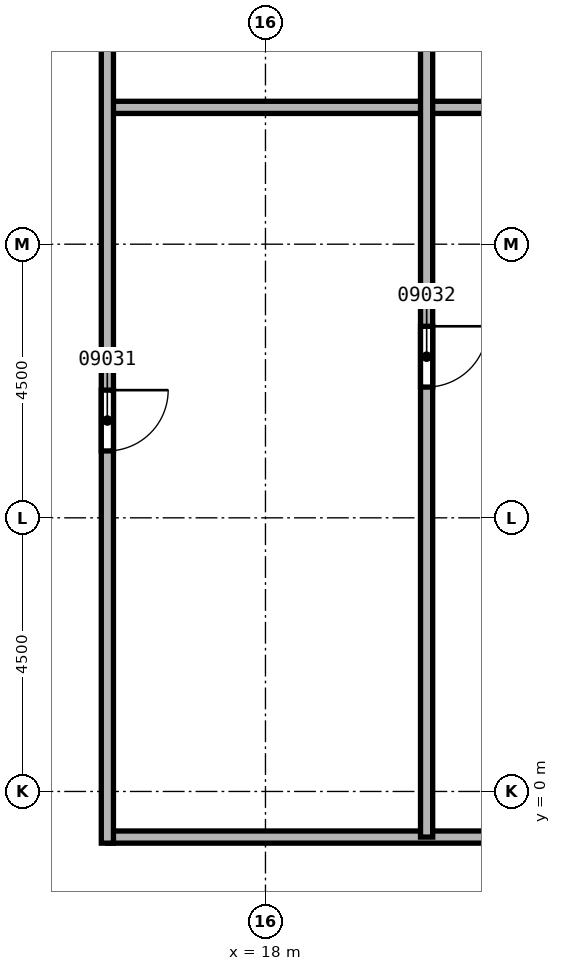
"""IFC4 building model, lengths in metres.
Left out: names, types, materials, properties, quantities, classifications, styles, units other than length and angle.
Written with IfcOpenShell. Run it as: python <this file> out.ifc"""

import sys

from ifc_helpers import new_model, si_unit, direction, frame, frame_2d, origin, place, context, subcontext, project, spatial, rectangle, extrude, element, fill, save


model = new_model("IFC4")
c1 = context("Model", 3, precision=1e-05, world=origin(), true_north=direction((0.0, 1.0)))
c2 = subcontext(c1, "Body", "Model", "MODEL_VIEW")
j1 = project(units=[si_unit("LENGTHUNIT", "METRE"), si_unit("PLANEANGLEUNIT", "RADIAN")], contexts=[c1])
p1 = place(None, origin())
s1 = spatial("IfcSite", under=j1, at=p1, CompositionType="ELEMENT")
p2 = place(p1, origin())
s2 = spatial("IfcBuilding", under=s1, at=p2, CompositionType="ELEMENT")
p3 = place(p2, frame((0.0, 0.0, 162.0)))
s3 = spatial("IfcBuildingStorey", under=s2, at=p3, CompositionType="ELEMENT", Elevation=162.0)
p4 = place(p3, frame((15.4, -0.75, 0.0), z_axis=(0.0, 0.0, 1.0), x_axis=(1.0, 0.0, 0.0)))
e1 = element("IfcWall", 1, at=p4, inside=s3, PredefinedType="PARTITIONING", context=c2, shape_type="SweptSolid", body=[
    extrude(rectangle(XDim=18.45, YDim=0.2, at=frame_2d((9.225, 0.0))), origin(), (0.0, 0.0, 1.0), 3.7),
])
p5 = place(p3, frame((15.4, 11.25, 0.0), z_axis=(0.0, 0.0, 1.0), x_axis=(1.0, 0.0, 0.0)))
e2 = element("IfcWall", 2, at=p5, inside=s3, PredefinedType="PARTITIONING", context=c2, shape_type="SweptSolid", body=[
    extrude(rectangle(XDim=11.7, YDim=0.2, at=frame_2d((5.85, 0.0))), origin(), (0.0, 0.0, 1.0), 3.7),
])
p6 = place(p3, frame((15.4, 23.25, 0.0), z_axis=(0.0, 0.0, 1.0), x_axis=(0.0, -1.0, 0.0)))
e3 = element("IfcWall", 3, at=p6, inside=s3, PredefinedType="PARTITIONING", context=c2, shape_type="SweptSolid", body=[
    extrude(rectangle(XDim=24.1, YDim=0.2, at=frame_2d((12.05, 0.0))), origin(), (0.0, 0.0, 1.0), 3.7),
])
p7 = place(p6, frame((16.65, 0.0, 0.0)))
e4 = element("IfcOpeningElement", 4, at=p7, cuts=e3, PredefinedType="OPENING", context=c2, shape_type="SweptSolid", body=[
    extrude(rectangle(XDim=1.0, YDim=2.1, at=frame_2d((0.5, 1.05))), frame((0.0, 0.1, 0.0), z_axis=(0.0, -1.0, 0.0), x_axis=(1.0, 0.0, 0.0)), (0.0, 0.0, 1.0), 0.2),
])
p8 = place(p6, frame((2.8, 0.0, 0.0)))
e5 = element("IfcOpeningElement", 5, at=p8, cuts=e3, PredefinedType="OPENING", context=c2, shape_type="SweptSolid", body=[
    extrude(rectangle(XDim=1.0, YDim=2.1, at=frame_2d((0.5, 1.05))), frame((0.0, 0.1, 0.0), z_axis=(0.0, -1.0, 0.0), x_axis=(1.0, 0.0, 0.0)), (0.0, 0.0, 1.0), 0.2),
])
p9 = place(p3, frame((20.65, 23.25, 0.0), z_axis=(0.0, 0.0, 1.0), x_axis=(0.0, -1.0, 0.0)))
e6 = element("IfcWall", 6, at=p9, inside=s3, PredefinedType="PARTITIONING", context=c2, shape_type="SweptSolid", body=[
    extrude(rectangle(XDim=24.0, YDim=0.2, at=frame_2d((12.0, 0.0))), origin(), (0.0, 0.0, 1.0), 3.7),
])
p10 = place(p9, frame((15.6, 0.0, 0.0)))
e7 = element("IfcOpeningElement", 7, at=p10, cuts=e6, PredefinedType="OPENING", context=c2, shape_type="SweptSolid", body=[
    extrude(rectangle(XDim=1.0, YDim=2.1, at=frame_2d((0.5, 1.05))), frame((0.0, 0.1, 0.0), z_axis=(0.0, -1.0, 0.0), x_axis=(1.0, 0.0, 0.0)), (0.0, 0.0, 1.0), 0.2),
])
p11 = place(p9, frame((8.2, 0.0, 0.0)))
e8 = element("IfcOpeningElement", 8, at=p11, cuts=e6, PredefinedType="OPENING", context=c2, shape_type="SweptSolid", body=[
    extrude(rectangle(XDim=1.0, YDim=2.1, at=frame_2d((0.5, 1.05))), frame((0.0, 0.1, 0.0), z_axis=(0.0, -1.0, 0.0), x_axis=(1.0, 0.0, 0.0)), (0.0, 0.0, 1.0), 0.2),
])
p12 = place(p7, origin())
e9 = element("IfcDoor", 9, at=p12, inside=s3, OperationType="SINGLE_SWING_RIGHT", PredefinedType="DOOR", context=c2, shape_type="SweptSolid", body=[
    extrude(rectangle(XDim=1.0, YDim=2.1, at=frame_2d((0.5, 1.05))), frame((0.0, 0.025, 0.0), z_axis=(0.0, -1.0, 0.0), x_axis=(1.0, 0.0, 0.0)), (0.0, 0.0, 1.0), 0.05),
])
fill(e4, e9)
p13 = place(p10, origin())
e10 = element("IfcDoor", 10, at=p13, inside=s3, OperationType="SINGLE_SWING_LEFT", PredefinedType="DOOR", context=c2, shape_type="SweptSolid", body=[
    extrude(rectangle(XDim=1.0, YDim=2.1, at=frame_2d((0.5, 1.05))), frame((0.0, 0.025, 0.0), z_axis=(0.0, -1.0, 0.0), x_axis=(1.0, 0.0, 0.0)), (0.0, 0.0, 1.0), 0.05),
])
fill(e7, e10)
save(model, sys.argv[1])
